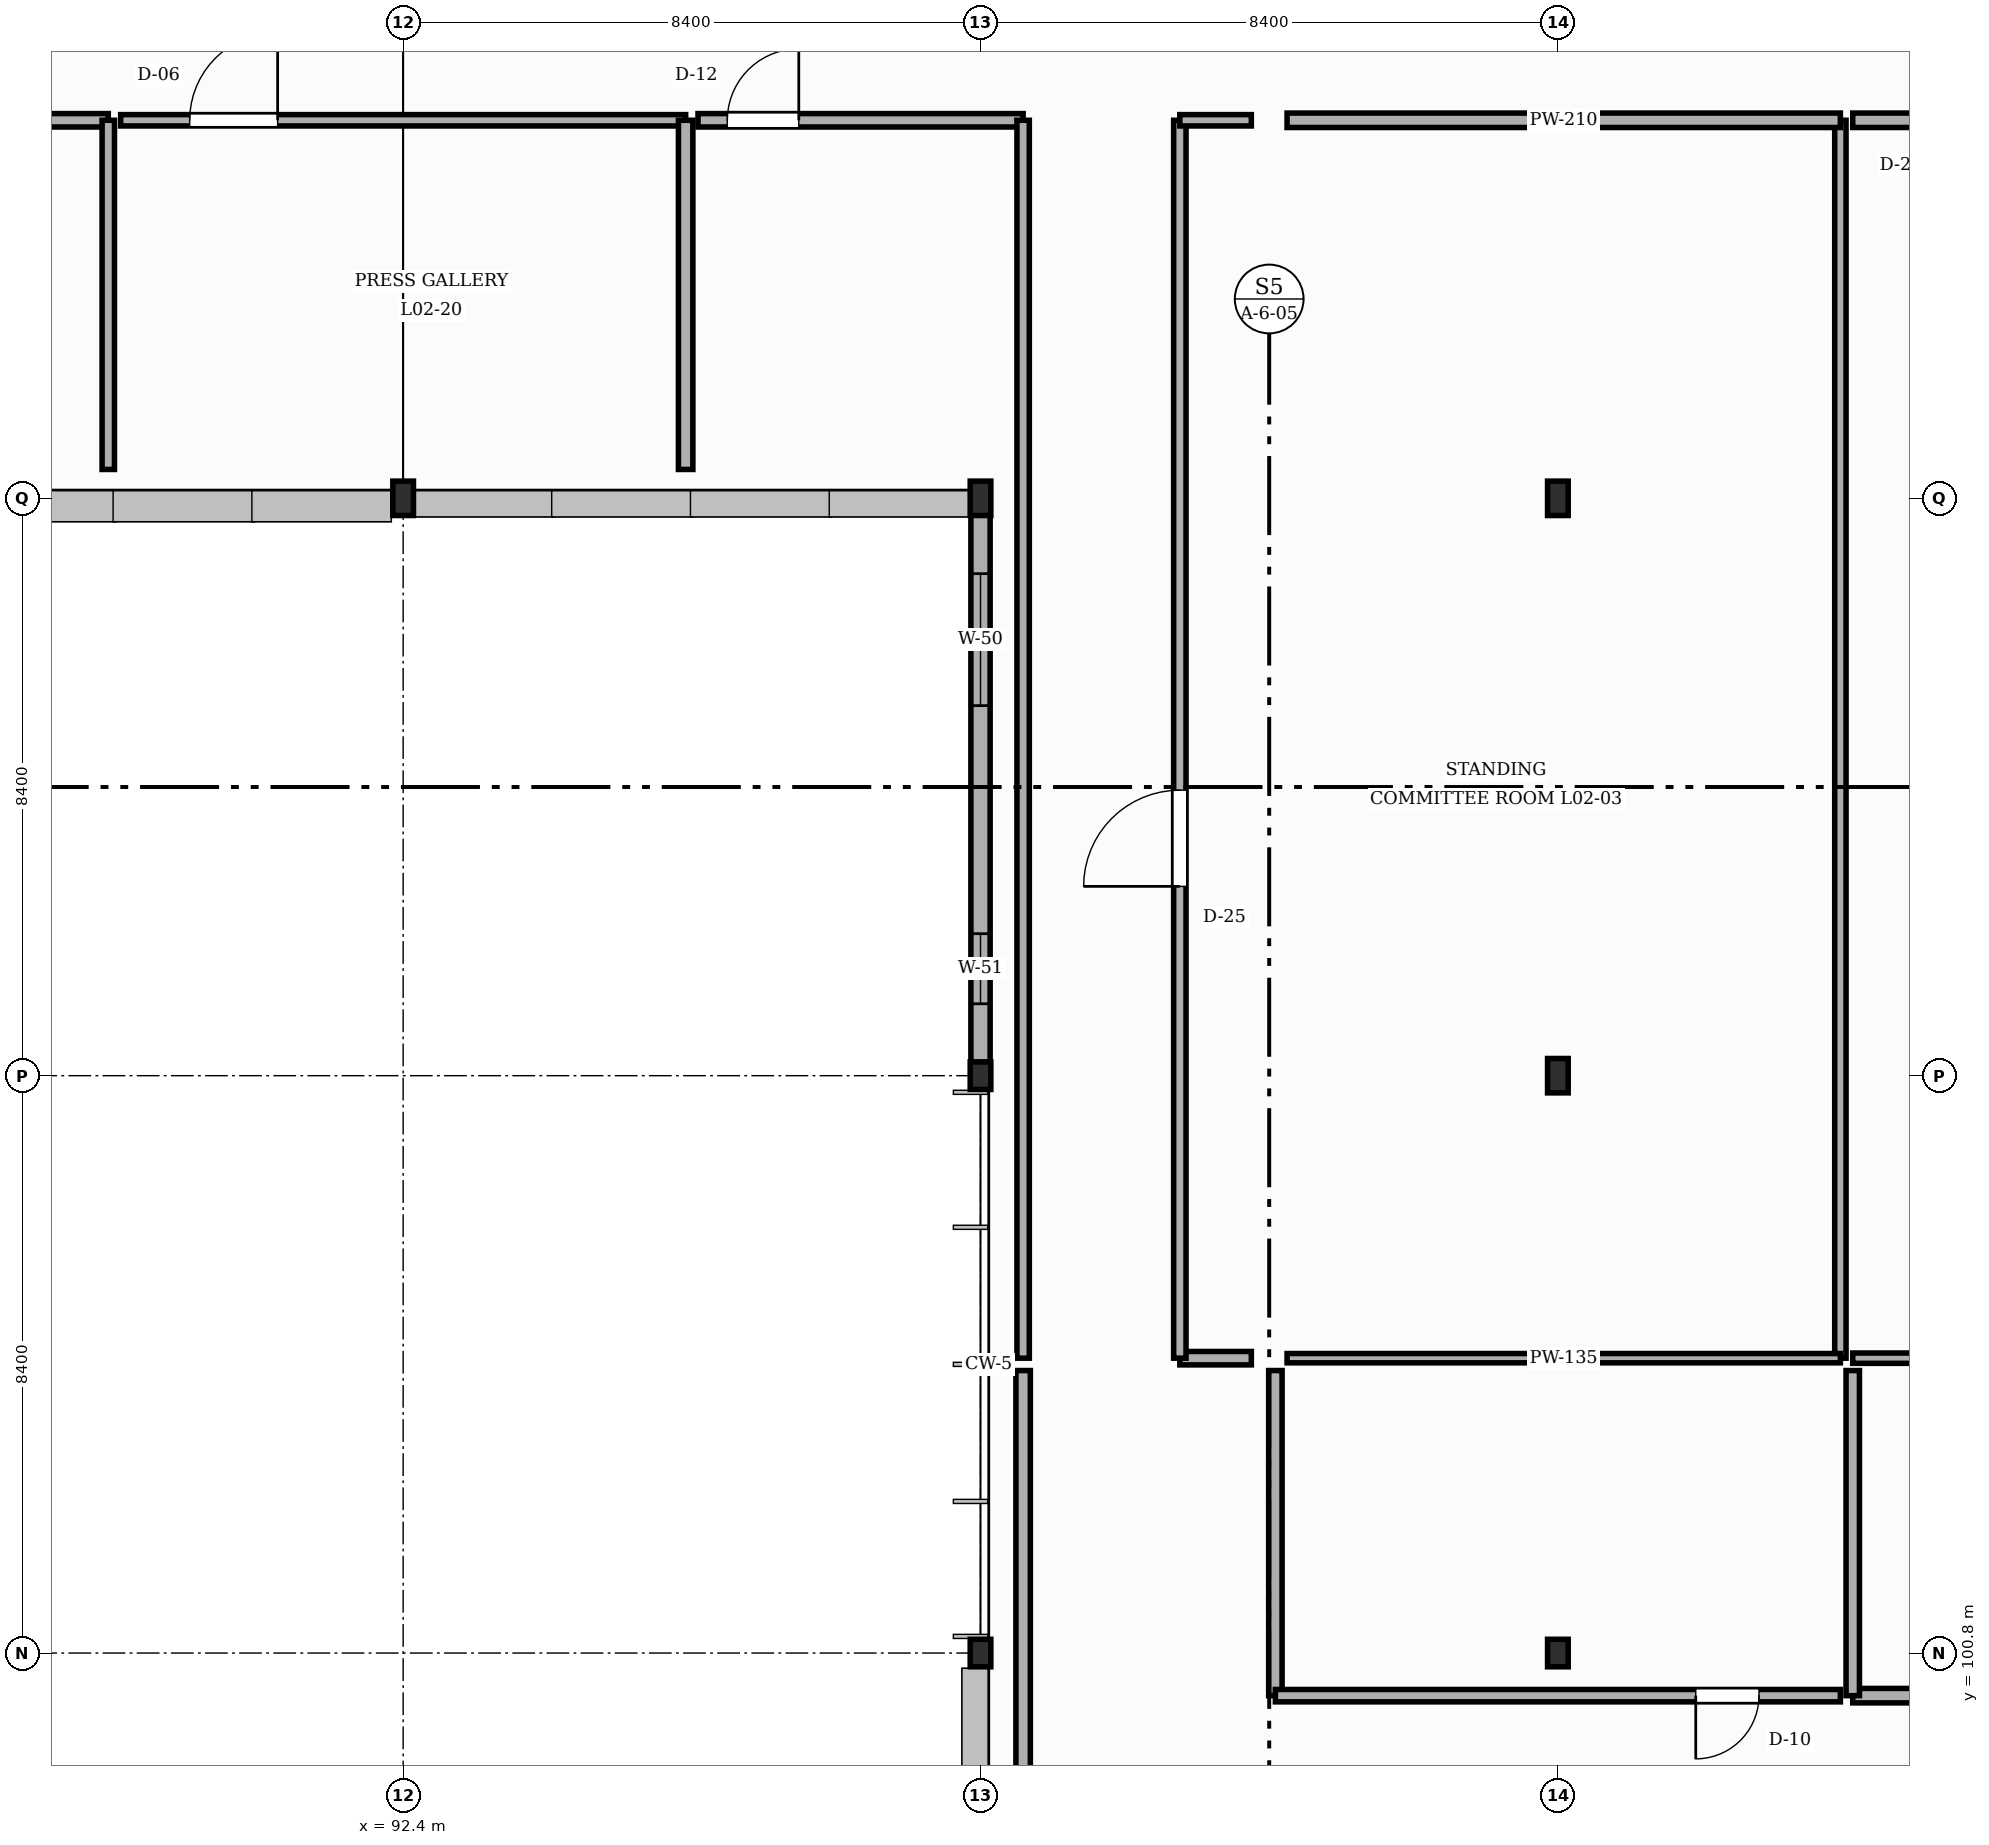
"""IFC4 building model, lengths in metres.
Left out: names, types, materials, properties, quantities, classifications, styles, units other than length and angle.
Written with IfcOpenShell. Run it as: python <this file> out.ifc"""

import sys

from ifc_helpers import new_model, si_unit, direction, frame, frame_2d, origin, origin_2d, place, context, subcontext, project, spatial, rectangle, i_section, extrude, element, fill, save


model = new_model("IFC4")
c1 = context("Model", 3, precision=1e-05, world=origin(), true_north=direction((0.0, 1.0)))
c2 = subcontext(c1, "Body", "Model", "MODEL_VIEW")
j1 = project(units=[si_unit("LENGTHUNIT", "METRE"), si_unit("PLANEANGLEUNIT", "RADIAN")], contexts=[c1])
p1 = place(None, origin())
s1 = spatial("IfcSite", under=j1, at=p1, CompositionType="ELEMENT")
p2 = place(p1, origin())
s2 = spatial("IfcBuilding", under=s1, at=p2, CompositionType="ELEMENT")
p3 = place(p2, frame((0.0, 0.0, 9.9)))
s3 = spatial("IfcBuildingStorey", under=s2, at=p3, CompositionType="ELEMENT", Elevation=9.9)
p4 = place(p3, frame((92.4, 117.6, 0.0), z_axis=(0.0, 0.0, 1.0), x_axis=(1.0, 0.0, 0.0)))
e1 = element("IfcColumn", 1, at=p4, inside=s3, PredefinedType="COLUMN", context=c2, shape_type="SweptSolid", body=[
    extrude(i_section(OverallWidth=0.3, OverallDepth=0.5, WebThickness=0.014, FlangeThickness=0.028, FilletRadius=0.027, at=origin_2d()), origin(), (0.0, 0.0, 1.0), 4.05),
])
for number, where, z_axis, x_axis in (
    (2, (100.8, 100.8, 0.0), (0.0, 0.0, 1.0), (1.0, 0.0, 0.0)),
    (3, (100.8, 109.2, 0.0), (0.0, 0.0, 1.0), (1.0, 0.0, 0.0)),
):
    element("IfcColumn", number, at=place(p3, frame(where, z_axis=z_axis, x_axis=x_axis)), inside=s3, PredefinedType="COLUMN", context=c2, shape_type="SweptSolid", body=[
        extrude(i_section(OverallWidth=0.3, OverallDepth=0.4, WebThickness=0.013, FlangeThickness=0.024, FilletRadius=0.027, at=origin_2d()), origin(), (0.0, 0.0, 1.0), 4.05),
    ])
p5 = place(p3, frame((100.8, 117.6, 0.0), z_axis=(0.0, 0.0, 1.0), x_axis=(1.0, 0.0, 0.0)))
e4 = element("IfcColumn", 4, at=p5, inside=s3, PredefinedType="COLUMN", context=c2, shape_type="SweptSolid", body=[
    extrude(i_section(OverallWidth=0.3, OverallDepth=0.5, WebThickness=0.014, FlangeThickness=0.028, FilletRadius=0.027, at=origin_2d()), origin(), (0.0, 0.0, 1.0), 4.05),
])
p6 = place(p3, frame((109.2, 100.8, 0.0), z_axis=(0.0, 0.0, 1.0), x_axis=(1.0, 0.0, 0.0)))
e5 = element("IfcColumn", 5, at=p6, inside=s3, PredefinedType="COLUMN", context=c2, shape_type="SweptSolid", body=[
    extrude(i_section(OverallWidth=0.3, OverallDepth=0.4, WebThickness=0.013, FlangeThickness=0.024, FilletRadius=0.027, at=origin_2d()), origin(), (0.0, 0.0, 1.0), 4.05),
])
for number, where, z_axis, x_axis in (
    (6, (109.2, 109.2, 0.0), (0.0, 0.0, 1.0), (1.0, 0.0, 0.0)),
    (7, (109.2, 117.6, 0.0), (0.0, 0.0, 1.0), (1.0, 0.0, 0.0)),
):
    element("IfcColumn", number, at=place(p3, frame(where, z_axis=z_axis, x_axis=x_axis)), inside=s3, PredefinedType="COLUMN", context=c2, shape_type="SweptSolid", body=[
        extrude(i_section(OverallWidth=0.3, OverallDepth=0.5, WebThickness=0.014, FlangeThickness=0.028, FilletRadius=0.027, at=origin_2d()), origin(), (0.0, 0.0, 1.0), 4.05),
    ])
p7 = place(p3, frame((100.8, 117.354, 0.0), z_axis=(0.0, 0.0, 1.0), x_axis=(0.0, -1.0, 0.0)))
e8 = element("IfcWall", 8, at=p7, inside=s3, PredefinedType="STANDARD", context=c2, shape_type="SweptSolid", body=[
    extrude(rectangle(XDim=7.958, YDim=0.28, at=frame_2d((3.979, 0.0))), origin(), (0.0, 0.0, 1.0), 3.562),
])
p8 = place(p7, frame((0.85, 0.0, 0.9)))
e9 = element("IfcOpeningElement", 9, at=p8, cuts=e8, PredefinedType="OPENING", context=c2, shape_type="SweptSolid", body=[
    extrude(rectangle(XDim=1.92, YDim=1.85, at=frame_2d((0.96, 0.925))), frame((0.0, 0.15, 0.0), z_axis=(0.0, -1.0, 0.0), x_axis=(1.0, 0.0, 0.0)), (0.0, 0.0, 1.0), 0.3),
])
p9 = place(p7, frame((6.088, 0.0, 0.9)))
e10 = element("IfcOpeningElement", 10, at=p9, cuts=e8, PredefinedType="OPENING", context=c2, shape_type="SweptSolid", body=[
    extrude(rectangle(XDim=1.02, YDim=2.05, at=frame_2d((0.51, 1.025))), frame((0.0, 0.15, 0.0), z_axis=(0.0, -1.0, 0.0), x_axis=(1.0, 0.0, 0.0)), (0.0, 0.0, 1.0), 0.3),
])
p10 = place(p3, frame((113.31, 123.1, -0.004), z_axis=(0.0, 0.0, 1.0), x_axis=(0.0, -1.0, 0.0)))
e11 = element("IfcWall", 11, at=p10, inside=s3, PredefinedType="STANDARD", context=c2, shape_type="SweptSolid", body=[
    extrude(rectangle(XDim=18.01, YDim=0.165, at=frame_2d((9.005, 0.0))), origin(), (0.0, 0.0, 1.0), 3.844),
])
p11 = place(p3, frame((113.31, 105.09, -0.004), z_axis=(0.0, 0.0, 1.0), x_axis=(-1.0, 0.0, 0.0)))
e12 = element("IfcWall", 12, at=p11, inside=s3, PredefinedType="STANDARD", context=c2, shape_type="SweptSolid", body=[
    extrude(rectangle(XDim=8.05, YDim=0.135, at=frame_2d((4.025, 0.0))), origin(), (0.0, 0.0, 1.0), 3.844),
])
p12 = place(p3, frame((104.74, 105.09, -0.004), z_axis=(0.0, 0.0, 1.0), x_axis=(-1.0, 0.0, 0.0)))
e13 = element("IfcWall", 13, at=p12, inside=s3, PredefinedType="STANDARD", context=c2, shape_type="SweptSolid", body=[
    extrude(rectangle(XDim=1.04, YDim=0.195, at=frame_2d((0.52, 0.0))), origin(), (0.0, 0.0, 1.0), 3.844),
])
p13 = place(p3, frame((103.7, 105.09, -0.004), z_axis=(0.0, 0.0, 1.0), x_axis=(0.0, 1.0, 0.0)))
e14 = element("IfcWall", 14, at=p13, inside=s3, PredefinedType="STANDARD", context=c2, shape_type="SweptSolid", body=[
    extrude(rectangle(XDim=18.01, YDim=0.18, at=frame_2d((9.005, 0.0))), origin(), (0.0, 0.0, 1.0), 3.536),
])
p14 = place(p13, frame((6.864, 0.0, 0.0)))
e15 = element("IfcOpeningElement", 15, at=p14, cuts=e14, PredefinedType="OPENING", context=c2, shape_type="SweptSolid", body=[
    extrude(rectangle(XDim=1.4, YDim=2.22, at=frame_2d((0.7, 1.11))), frame((0.0, 0.1, 0.0), z_axis=(0.0, -1.0, 0.0), x_axis=(1.0, 0.0, 0.0)), (0.0, 0.0, 1.0), 0.2),
])
p15 = place(p3, frame((103.7, 123.1, -0.004), z_axis=(0.0, 0.0, 1.0), x_axis=(1.0, 0.0, 0.0)))
e16 = element("IfcWall", 16, at=p15, inside=s3, PredefinedType="STANDARD", context=c2, shape_type="SweptSolid", body=[
    extrude(rectangle(XDim=1.04, YDim=0.165, at=frame_2d((0.52, 0.0))), origin(), (0.0, 0.0, 1.0), 3.844),
])
p16 = place(p3, frame((105.26, 123.1, -0.004), z_axis=(0.0, 0.0, 1.0), x_axis=(1.0, 0.0, 0.0)))
e17 = element("IfcWall", 17, at=p16, inside=s3, PredefinedType="STANDARD", context=c2, shape_type="SweptSolid", body=[
    extrude(rectangle(XDim=8.05, YDim=0.21, at=frame_2d((4.025, 0.0))), origin(), (0.0, 0.0, 1.0), 3.844),
])
p17 = place(p3, frame((117.18, 105.09, -0.004), z_axis=(0.0, 0.0, 1.0), x_axis=(-1.0, 0.0, 0.0)))
e18 = element("IfcWall", 18, at=p17, inside=s3, PredefinedType="STANDARD", context=c2, shape_type="SweptSolid", body=[
    extrude(rectangle(XDim=3.69, YDim=0.15, at=frame_2d((1.845, 0.0))), origin(), (0.0, 0.0, 1.0), 3.844),
])
p18 = place(p3, frame((113.49, 123.1, -0.004), z_axis=(0.0, 0.0, 1.0), x_axis=(1.0, 0.0, 0.0)))
e19 = element("IfcWall", 19, at=p18, inside=s3, PredefinedType="STANDARD", context=c2, shape_type="SweptSolid", body=[
    extrude(rectangle(XDim=8.22, YDim=0.21, at=frame_2d((4.11, 0.0))), origin(), (0.0, 0.0, 1.0), 3.844),
])
p19 = place(p18, frame((1.154, 0.0, 0.0)))
e20 = element("IfcOpeningElement", 20, at=p19, cuts=e19, PredefinedType="OPENING", context=c2, shape_type="SweptSolid", body=[
    extrude(rectangle(XDim=0.98, YDim=2.3, at=frame_2d((0.49, 1.15))), frame((0.0, 0.115, 0.0), z_axis=(0.0, -1.0, 0.0), x_axis=(1.0, 0.0, 0.0)), (0.0, 0.0, 1.0), 0.23),
])
p20 = place(p3, frame((116.98, 100.18, -0.004), z_axis=(0.0, 0.0, 1.0), x_axis=(-1.0, 0.0, 0.0)))
e21 = element("IfcWall", 21, at=p20, inside=s3, PredefinedType="STANDARD", context=c2, shape_type="SweptSolid", body=[
    extrude(rectangle(XDim=3.49, YDim=0.21, at=frame_2d((1.745, 0.0))), origin(), (0.0, 0.0, 1.0), 3.844),
])
p21 = place(p3, frame((113.49, 100.18, -0.004), z_axis=(0.0, 0.0, 1.0), x_axis=(0.0, 1.0, 0.0)))
e22 = element("IfcWall", 22, at=p21, inside=s3, PredefinedType="STANDARD", context=c2, shape_type="SweptSolid", body=[
    extrude(rectangle(XDim=4.73, YDim=0.195, at=frame_2d((2.365, 0.0))), origin(), (0.0, 0.0, 1.0), 3.844),
])
p22 = place(p3, frame((101.42, 104.91, -0.004), z_axis=(0.0, 0.0, 1.0), x_axis=(0.0, -1.0, 0.0)))
e23 = element("IfcWall", 23, at=p22, inside=s3, PredefinedType="STANDARD", context=c2, shape_type="SweptSolid", body=[
    extrude(rectangle(XDim=15.69, YDim=0.21, at=frame_2d((7.845, 0.0))), origin(), (0.0, 0.0, 1.0), 3.844),
])
p23 = place(p3, frame((79.89, 123.1, -0.004), z_axis=(0.0, 0.0, 1.0), x_axis=(1.0, 0.0, 0.0)))
e24 = element("IfcWall", 24, at=p23, inside=s3, PredefinedType="STANDARD", context=c2, shape_type="SweptSolid", body=[
    extrude(rectangle(XDim=8.22, YDim=0.195, at=frame_2d((4.11, 0.0))), origin(), (0.0, 0.0, 1.0), 3.844),
])
p24 = place(p23, frame((1.054, 0.0, 0.0)))
e25 = element("IfcOpeningElement", 25, at=p24, cuts=e24, PredefinedType="OPENING", context=c2, shape_type="SweptSolid", body=[
    extrude(rectangle(XDim=1.18, YDim=2.06, at=frame_2d((0.59, 1.03))), frame((0.0, 0.107, 0.0), z_axis=(0.0, -1.0, 0.0), x_axis=(1.0, 0.0, 0.0)), (0.0, 0.0, 1.0), 0.215),
])
p25 = place(p3, frame((88.11, 123.1, -0.004), z_axis=(0.0, 0.0, 1.0), x_axis=(0.0, -1.0, 0.0)))
e26 = element("IfcWall", 26, at=p25, inside=s3, PredefinedType="STANDARD", context=c2, shape_type="SweptSolid", body=[
    extrude(rectangle(XDim=5.08, YDim=0.18, at=frame_2d((2.54, 0.0))), origin(), (0.0, 0.0, 1.0), 3.844),
])
p26 = place(p3, frame((88.29, 123.1, -0.004), z_axis=(0.0, 0.0, 1.0), x_axis=(1.0, 0.0, 0.0)))
e27 = element("IfcWall", 27, at=p26, inside=s3, PredefinedType="STANDARD", context=c2, shape_type="SweptSolid", body=[
    extrude(rectangle(XDim=8.22, YDim=0.165, at=frame_2d((4.11, 0.0))), origin(), (0.0, 0.0, 1.0), 3.844),
])
p27 = place(p26, frame((1.004, 0.0, 0.0)))
e28 = element("IfcOpeningElement", 28, at=p27, cuts=e27, PredefinedType="OPENING", context=c2, shape_type="SweptSolid", body=[
    extrude(rectangle(XDim=1.28, YDim=2.06, at=frame_2d((0.64, 1.03))), frame((0.0, 0.093, 0.0), z_axis=(0.0, -1.0, 0.0), x_axis=(1.0, 0.0, 0.0)), (0.0, 0.0, 1.0), 0.185),
])
p28 = place(p3, frame((96.51, 123.1, -0.004), z_axis=(0.0, 0.0, 1.0), x_axis=(0.0, -1.0, 0.0)))
e29 = element("IfcWall", 29, at=p28, inside=s3, PredefinedType="STANDARD", context=c2, shape_type="SweptSolid", body=[
    extrude(rectangle(XDim=5.08, YDim=0.21, at=frame_2d((2.54, 0.0))), origin(), (0.0, 0.0, 1.0), 3.844),
])
p29 = place(p3, frame((105.09, 100.18, -0.004), z_axis=(0.0, 0.0, 1.0), x_axis=(0.0, 1.0, 0.0)))
e30 = element("IfcWall", 30, at=p29, inside=s3, PredefinedType="STANDARD", context=c2, shape_type="SweptSolid", body=[
    extrude(rectangle(XDim=4.73, YDim=0.195, at=frame_2d((2.365, 0.0))), origin(), (0.0, 0.0, 1.0), 3.844),
])
p30 = place(p3, frame((113.31, 100.18, -0.004), z_axis=(0.0, 0.0, 1.0), x_axis=(-1.0, 0.0, 0.0)))
e31 = element("IfcWall", 31, at=p30, inside=s3, PredefinedType="STANDARD", context=c2, shape_type="SweptSolid", body=[
    extrude(rectangle(XDim=8.22, YDim=0.18, at=frame_2d((4.11, 0.0))), origin(), (0.0, 0.0, 1.0), 3.844),
])
p31 = place(p30, frame((1.184, 0.0, 0.0)))
e32 = element("IfcOpeningElement", 32, at=p31, cuts=e31, PredefinedType="OPENING", context=c2, shape_type="SweptSolid", body=[
    extrude(rectangle(XDim=0.92, YDim=2.14, at=frame_2d((0.46, 1.07))), frame((0.0, 0.1, 0.0), z_axis=(0.0, -1.0, 0.0), x_axis=(1.0, 0.0, 0.0)), (0.0, 0.0, 1.0), 0.2),
])
p32 = place(p3, frame((96.69, 123.1, -0.004), z_axis=(0.0, 0.0, 1.0), x_axis=(1.0, 0.0, 0.0)))
e33 = element("IfcWall", 33, at=p32, inside=s3, PredefinedType="STANDARD", context=c2, shape_type="SweptSolid", body=[
    extrude(rectangle(XDim=4.73, YDim=0.195, at=frame_2d((2.365, 0.0))), origin(), (0.0, 0.0, 1.0), 3.844),
])
p33 = place(p32, frame((0.426, 0.0, 0.0)))
e34 = element("IfcOpeningElement", 34, at=p33, cuts=e33, PredefinedType="OPENING", context=c2, shape_type="SweptSolid", body=[
    extrude(rectangle(XDim=1.04, YDim=2.14, at=frame_2d((0.52, 1.07))), frame((0.0, 0.107, 0.0), z_axis=(0.0, -1.0, 0.0), x_axis=(1.0, 0.0, 0.0)), (0.0, 0.0, 1.0), 0.215),
])
p34 = place(p3, frame((101.42, 123.1, -0.004), z_axis=(0.0, 0.0, 1.0), x_axis=(0.0, -1.0, 0.0)))
e35 = element("IfcWall", 35, at=p34, inside=s3, PredefinedType="STANDARD", context=c2, shape_type="SweptSolid", body=[
    extrude(rectangle(XDim=18.01, YDim=0.18, at=frame_2d((9.005, 0.0))), origin(), (0.0, 0.0, 1.0), 3.844),
])
p35 = place(p8, origin())
e36 = element("IfcWindow", 36, at=p35, inside=s3, PartitioningType="SINGLE_PANEL", PredefinedType="WINDOW", context=c2, shape_type="SweptSolid", body=[
    extrude(rectangle(XDim=1.92, YDim=1.85, at=frame_2d((0.96, 0.925))), frame((0.0, 0.03, 0.0), z_axis=(0.0, -1.0, 0.0), x_axis=(1.0, 0.0, 0.0)), (0.0, 0.0, 1.0), 0.06),
])
fill(e9, e36)
p36 = place(p9, origin())
e37 = element("IfcWindow", 37, at=p36, inside=s3, PartitioningType="SINGLE_PANEL", PredefinedType="WINDOW", context=c2, shape_type="SweptSolid", body=[
    extrude(rectangle(XDim=1.02, YDim=2.05, at=frame_2d((0.51, 1.025))), frame((0.0, 0.03, 0.0), z_axis=(0.0, -1.0, 0.0), x_axis=(1.0, 0.0, 0.0)), (0.0, 0.0, 1.0), 0.06),
])
fill(e10, e37)
p37 = place(p14, origin())
e38 = element("IfcDoor", 38, at=p37, inside=s3, OperationType="SINGLE_SWING_LEFT", PredefinedType="DOOR", context=c2, shape_type="SweptSolid", body=[
    extrude(rectangle(XDim=1.4, YDim=2.22, at=frame_2d((0.7, 1.11))), frame((0.0, 0.025, 0.0), z_axis=(0.0, -1.0, 0.0), x_axis=(1.0, 0.0, 0.0)), (0.0, 0.0, 1.0), 0.05),
])
fill(e15, e38)
p38 = place(p27, origin())
e39 = element("IfcDoor", 39, at=p38, inside=s3, OperationType="SINGLE_SWING_RIGHT", PredefinedType="DOOR", context=c2, shape_type="SweptSolid", body=[
    extrude(rectangle(XDim=1.28, YDim=2.06, at=frame_2d((0.64, 1.03))), frame((0.0, 0.025, 0.0), z_axis=(0.0, -1.0, 0.0), x_axis=(1.0, 0.0, 0.0)), (0.0, 0.0, 1.0), 0.05),
])
fill(e28, e39)
p39 = place(p31, origin())
e40 = element("IfcDoor", 40, at=p39, inside=s3, OperationType="SINGLE_SWING_RIGHT", PredefinedType="DOOR", context=c2, shape_type="SweptSolid", body=[
    extrude(rectangle(XDim=0.92, YDim=2.14, at=frame_2d((0.46, 1.07))), frame((0.0, 0.025, 0.0), z_axis=(0.0, -1.0, 0.0), x_axis=(1.0, 0.0, 0.0)), (0.0, 0.0, 1.0), 0.05),
])
fill(e32, e40)
p40 = place(p33, origin())
e41 = element("IfcDoor", 41, at=p40, inside=s3, OperationType="SINGLE_SWING_RIGHT", PredefinedType="DOOR", context=c2, shape_type="SweptSolid", body=[
    extrude(rectangle(XDim=1.04, YDim=2.14, at=frame_2d((0.52, 1.07))), frame((0.0, 0.025, 0.0), z_axis=(0.0, -1.0, 0.0), x_axis=(1.0, 0.0, 0.0)), (0.0, 0.0, 1.0), 0.05),
])
fill(e34, e41)
save(model, sys.argv[1])
